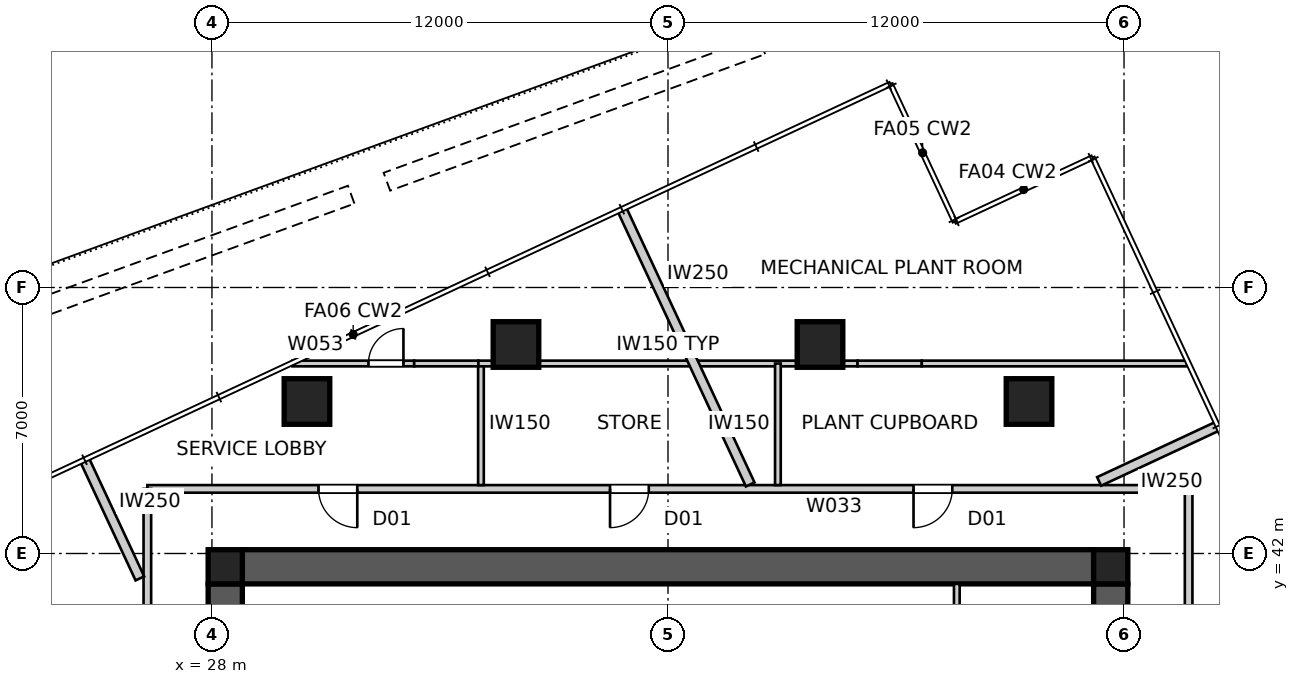
"""IFC4 building model, lengths in metres.
Left out: names, types, materials, properties, quantities, classifications, styles, units other than length and angle.
Written with IfcOpenShell. Run it as: python <this file> out.ifc"""

import sys

from ifc_helpers import new_model, si_unit, direction, frame, frame_2d, origin, origin_2d, place, context, subcontext, project, spatial, polyline, rectangle, outline, extrude, element, fill, save


model = new_model("IFC4")
c1 = context("Model", 3, precision=1e-05, world=origin(), true_north=direction((0.0, 1.0)))
c2 = subcontext(c1, "Body", "Model", "MODEL_VIEW")
j1 = project(units=[si_unit("LENGTHUNIT", "METRE"), si_unit("PLANEANGLEUNIT", "RADIAN")], contexts=[c1])
p1 = place(None, origin())
s1 = spatial("IfcSite", under=j1, at=p1, CompositionType="ELEMENT")
p2 = place(p1, origin())
s2 = spatial("IfcBuilding", under=s1, at=p2, CompositionType="ELEMENT")
p3 = place(p2, frame((0.0, 0.0, 171.0)))
s3 = spatial("IfcBuildingStorey", under=s2, at=p3, CompositionType="ELEMENT", Elevation=171.0)
p4 = place(p3, frame((28.8, 41.65, 0.0), z_axis=(0.0, 0.0, 1.0), x_axis=(1.0, 0.0, 0.0)))
e1 = element("IfcWall", 1, at=p4, inside=s3, PredefinedType="SHEAR", context=c2, shape_type="SweptSolid", body=[
    extrude(outline(polyline([(0.0, -0.45), (22.4, -0.45), (22.4, -0.025), (22.85, -0.025), (22.85, 0.025), (22.4, 0.025), (22.4, 0.45), (0.0, 0.45), (0.0, 0.025), (-0.45, 0.025), (-0.45, -0.025), (0.0, -0.025), (0.0, -0.45)])), origin(), (0.0, 0.0, 1.0), 5.0),
])
p5 = place(p3, frame((51.65, 18.8, 0.0), z_axis=(0.0, 0.0, 1.0), x_axis=(0.0, 1.0, 0.0)))
e2 = element("IfcWall", 2, at=p5, inside=s3, PredefinedType="SHEAR", context=c2, shape_type="SweptSolid", body=[
    extrude(outline(polyline([(0.0, -0.45), (22.4, -0.45), (22.4, -0.025), (22.85, -0.025), (22.85, 0.025), (22.4, 0.025), (22.4, 0.45), (0.0, 0.45), (0.0, 0.025), (-0.45, 0.025), (-0.45, -0.025), (0.0, -0.025), (0.0, -0.45)])), origin(), (0.0, 0.0, 1.0), 5.0),
])
p6 = place(p5, frame((11.14, 0.0, 0.0)))
e3 = element("IfcOpeningElement", 3, at=p6, cuts=e2, PredefinedType="OPENING", context=c2, shape_type="SweptSolid", body=[
    extrude(rectangle(XDim=1.02, YDim=2.4, at=frame_2d((0.51, 1.2))), frame((0.0, 0.46, 0.0), z_axis=(0.0, -1.0, 0.0), x_axis=(1.0, 0.0, 0.0)), (0.0, 0.0, 1.0), 0.92),
])
p7 = place(p3, frame((28.35, 41.2, 0.0), z_axis=(0.0, 0.0, 1.0), x_axis=(0.0, -1.0, 0.0)))
e4 = element("IfcWall", 4, at=p7, inside=s3, PredefinedType="SHEAR", context=c2, shape_type="SweptSolid", body=[
    extrude(outline(polyline([(0.0, -0.45), (22.4, -0.45), (22.4, -0.025), (22.85, -0.025), (22.85, 0.025), (22.4, 0.025), (22.4, 0.45), (0.0, 0.45), (0.0, 0.025), (-0.45, 0.025), (-0.45, -0.025), (0.0, -0.025), (0.0, -0.45)])), origin(), (0.0, 0.0, 1.0), 5.0),
])
p8 = place(p7, frame((11.14, 0.0, 0.0)))
e5 = element("IfcOpeningElement", 5, at=p8, cuts=e4, PredefinedType="OPENING", context=c2, shape_type="SweptSolid", body=[
    extrude(rectangle(XDim=1.02, YDim=2.4, at=frame_2d((0.51, 1.2))), frame((0.0, 0.46, 0.0), z_axis=(0.0, -1.0, 0.0), x_axis=(1.0, 0.0, 0.0)), (0.0, 0.0, 1.0), 0.92),
])
for number, where, z_axis, x_axis in (
    (6, (51.65, 41.65, 0.0), (0.0, 0.0, 1.0), (1.0, 0.0, 0.0)),
    (7, (28.35, 41.65, 0.0), (0.0, 0.0, 1.0), (1.0, 0.0, 0.0)),
):
    element("IfcColumn", number, at=place(p3, frame(where, z_axis=z_axis, x_axis=x_axis)), inside=s3, PredefinedType="COLUMN", context=c2, shape_type="SweptSolid", body=[
        extrude(rectangle(XDim=0.9, YDim=0.9, at=origin_2d()), origin(), (0.0, 0.0, 1.0), 5.0),
    ])
for number, where, z_axis, x_axis in (
    (8, (49.5, 46.0, 0.0), (0.0, 0.0, 1.0), (1.0, 0.0, 0.0)),
    (9, (44.0, 47.5, 0.0), (0.0, 0.0, 1.0), (1.0, 0.0, 0.0)),
    (10, (36.0, 47.5, 0.0), (0.0, 0.0, 1.0), (1.0, 0.0, 0.0)),
    (11, (30.5, 46.0, 0.0), (0.0, 0.0, 1.0), (1.0, 0.0, 0.0)),
):
    element("IfcColumn", number, at=place(p3, frame(where, z_axis=z_axis, x_axis=x_axis)), inside=s3, PredefinedType="COLUMN", context=c2, shape_type="SweptSolid", body=[
        extrude(rectangle(XDim=1.2, YDim=1.2, at=origin_2d()), origin(), (0.0, 0.0, 1.0), 5.0),
    ])
p9 = place(p3, frame((53.7, 16.0, 0.0), z_axis=(0.0, 0.0, 1.0), x_axis=(0.0, 1.0, 0.0)))
e12 = element("IfcWall", 12, at=p9, inside=s3, PredefinedType="PARTITIONING", context=c2, shape_type="SweptSolid", body=[
    extrude(rectangle(XDim=27.7, YDim=0.2, at=frame_2d((13.85, 0.0))), origin(), (0.0, 0.0, 1.0), 4.85),
])
p10 = place(p9, frame((22.176, 0.0, 0.0)))
e13 = element("IfcOpeningElement", 13, at=p10, cuts=e12, PredefinedType="OPENING", context=c2, shape_type="SweptSolid", body=[
    extrude(rectangle(XDim=1.02, YDim=2.34, at=frame_2d((0.51, 1.17))), frame((0.0, 0.11, 0.0), z_axis=(0.0, -1.0, 0.0), x_axis=(1.0, 0.0, 0.0)), (0.0, 0.0, 1.0), 0.22),
])
p11 = place(p9, frame((6.519, 0.0, 0.0)))
e14 = element("IfcOpeningElement", 14, at=p11, cuts=e12, PredefinedType="OPENING", context=c2, shape_type="SweptSolid", body=[
    extrude(rectangle(XDim=1.02, YDim=2.34, at=frame_2d((0.51, 1.17))), frame((0.0, 0.11, 0.0), z_axis=(0.0, -1.0, 0.0), x_axis=(1.0, 0.0, 0.0)), (0.0, 0.0, 1.0), 0.22),
])
p12 = place(p9, frame((14.505, 0.0, 0.0)))
e15 = element("IfcOpeningElement", 15, at=p12, cuts=e12, PredefinedType="OPENING", context=c2, shape_type="SweptSolid", body=[
    extrude(rectangle(XDim=1.02, YDim=2.34, at=frame_2d((0.51, 1.17))), frame((0.0, 0.11, 0.0), z_axis=(0.0, -1.0, 0.0), x_axis=(1.0, 0.0, 0.0)), (0.0, 0.0, 1.0), 0.22),
])
p13 = place(p3, frame((53.7, 43.7, 0.0), z_axis=(0.0, 0.0, 1.0), x_axis=(-1.0, 0.0, 0.0)))
e16 = element("IfcWall", 16, at=p13, inside=s3, PredefinedType="PARTITIONING", context=c2, shape_type="SweptSolid", body=[
    extrude(rectangle(XDim=27.4, YDim=0.2, at=frame_2d((13.7, 0.0))), origin(), (0.0, 0.0, 1.0), 4.85),
])
p14 = place(p13, frame((21.876, 0.0, 0.0)))
e17 = element("IfcOpeningElement", 17, at=p14, cuts=e16, PredefinedType="OPENING", context=c2, shape_type="SweptSolid", body=[
    extrude(rectangle(XDim=1.02, YDim=2.34, at=frame_2d((0.51, 1.17))), frame((0.0, 0.11, 0.0), z_axis=(0.0, -1.0, 0.0), x_axis=(1.0, 0.0, 0.0)), (0.0, 0.0, 1.0), 0.22),
])
p15 = place(p13, frame((6.219, 0.0, 0.0)))
e18 = element("IfcOpeningElement", 18, at=p15, cuts=e16, PredefinedType="OPENING", context=c2, shape_type="SweptSolid", body=[
    extrude(rectangle(XDim=1.02, YDim=2.34, at=frame_2d((0.51, 1.17))), frame((0.0, 0.11, 0.0), z_axis=(0.0, -1.0, 0.0), x_axis=(1.0, 0.0, 0.0)), (0.0, 0.0, 1.0), 0.22),
])
p16 = place(p13, frame((14.205, 0.0, 0.0)))
e19 = element("IfcOpeningElement", 19, at=p16, cuts=e16, PredefinedType="OPENING", context=c2, shape_type="SweptSolid", body=[
    extrude(rectangle(XDim=1.02, YDim=2.34, at=frame_2d((0.51, 1.17))), frame((0.0, 0.11, 0.0), z_axis=(0.0, -1.0, 0.0), x_axis=(1.0, 0.0, 0.0)), (0.0, 0.0, 1.0), 0.22),
])
p17 = place(p3, frame((26.3, 43.7, 0.0), z_axis=(0.0, 0.0, 1.0), x_axis=(0.0, -1.0, 0.0)))
e20 = element("IfcWall", 20, at=p17, inside=s3, PredefinedType="PARTITIONING", context=c2, shape_type="SweptSolid", body=[
    extrude(rectangle(XDim=27.7, YDim=0.2, at=frame_2d((13.85, 0.0))), origin(), (0.0, 0.0, 1.0), 4.85),
])
p18 = place(p17, frame((18.87, 0.0, 0.0)))
e21 = element("IfcOpeningElement", 21, at=p18, cuts=e20, PredefinedType="OPENING", context=c2, shape_type="SweptSolid", body=[
    extrude(rectangle(XDim=1.02, YDim=2.34, at=frame_2d((0.51, 1.17))), frame((0.0, 0.11, 0.0), z_axis=(0.0, -1.0, 0.0), x_axis=(1.0, 0.0, 0.0)), (0.0, 0.0, 1.0), 0.22),
])
p19 = place(p17, frame((6.545, 0.0, 0.0)))
e22 = element("IfcOpeningElement", 22, at=p19, cuts=e20, PredefinedType="OPENING", context=c2, shape_type="SweptSolid", body=[
    extrude(rectangle(XDim=1.02, YDim=2.34, at=frame_2d((0.51, 1.17))), frame((0.0, 0.11, 0.0), z_axis=(0.0, -1.0, 0.0), x_axis=(1.0, 0.0, 0.0)), (0.0, 0.0, 1.0), 0.22),
])
p20 = place(p3, frame((54.467, 45.353, 0.0), z_axis=(0.0, 0.0, 1.0), x_axis=(-0.906322475905, -0.422586759932, 0.0)))
e23 = element("IfcWall", 23, at=p20, inside=s3, PredefinedType="PARTITIONING", context=c2, shape_type="SweptSolid", body=[
    extrude(rectangle(XDim=3.446, YDim=0.25, at=frame_2d((1.723, 0.0))), origin(), (0.0, 0.0, 1.0), 4.85),
])
p21 = place(p3, frame((38.786, 51.06, 0.0), z_axis=(0.0, 0.0, 1.0), x_axis=(0.422621224778, -0.906306405344, 0.0)))
e24 = element("IfcWall", 24, at=p21, inside=s3, PredefinedType="PARTITIONING", context=c2, shape_type="SweptSolid", body=[
    extrude(rectangle(XDim=7.992, YDim=0.25, at=frame_2d((3.996, 0.0))), origin(), (0.0, 0.0, 1.0), 4.85),
])
p22 = place(p3, frame((24.647, 44.467, 0.0), z_axis=(0.0, 0.0, 1.0), x_axis=(0.422586759932, -0.906322475905, 0.0)))
e25 = element("IfcWall", 25, at=p22, inside=s3, PredefinedType="PARTITIONING", context=c2, shape_type="SweptSolid", body=[
    extrude(rectangle(XDim=3.446, YDim=0.25, at=frame_2d((1.723, 0.0))), origin(), (0.0, 0.0, 1.0), 4.85),
])
p23 = place(p3, frame((47.6, 41.2, 0.0), z_axis=(0.0, 0.0, 1.0), x_axis=(0.0, -1.0, 0.0)))
e26 = element("IfcWall", 26, at=p23, inside=s3, PredefinedType="SOLIDWALL", context=c2, shape_type="SweptSolid", body=[
    extrude(rectangle(XDim=5.9, YDim=0.15, at=frame_2d((2.95, 0.0))), origin(), (0.0, 0.0, 1.0), 4.85),
])
p24 = place(p3, frame((35.078, 47.0, 0.0), z_axis=(0.0, 0.0, 1.0), x_axis=(0.0, -1.0, 0.0)))
e27 = element("IfcWall", 27, at=p24, inside=s3, PredefinedType="SOLIDWALL", context=c2, shape_type="SweptSolid", body=[
    extrude(rectangle(XDim=3.2, YDim=0.15, at=frame_2d((1.6, 0.0))), origin(), (0.0, 0.0, 1.0), 4.85),
])
p25 = place(p3, frame((30.119, 47.0, 0.0), z_axis=(0.0, 0.0, 1.0), x_axis=(1.0, 0.0, 0.0)))
e28 = element("IfcWall", 28, at=p25, inside=s3, PredefinedType="SOLIDWALL", context=c2, shape_type="SweptSolid", body=[
    extrude(rectangle(XDim=3.202, YDim=0.15, at=frame_2d((1.601, 0.0))), origin(), (0.0, 0.0, 1.0), 4.85),
])
p26 = place(p25, frame((2.0, 0.0, 0.0)))
e29 = element("IfcOpeningElement", 29, at=p26, cuts=e28, PredefinedType="OPENING", context=c2, shape_type="SweptSolid", body=[
    extrude(rectangle(XDim=0.92, YDim=2.1, at=frame_2d((0.46, 1.05))), frame((0.0, 0.085, 0.0), z_axis=(0.0, -1.0, 0.0), x_axis=(1.0, 0.0, 0.0)), (0.0, 0.0, 1.0), 0.17),
])
p27 = place(p3, frame((33.322, 47.0, 0.0), z_axis=(0.0, 0.0, 1.0), x_axis=(1.0, 0.0, 0.0)))
e30 = element("IfcWall", 30, at=p27, inside=s3, PredefinedType="SOLIDWALL", context=c2, shape_type="SweptSolid", body=[
    extrude(rectangle(XDim=1.69, YDim=0.15, at=frame_2d((0.845, 0.0))), origin(), (0.0, 0.0, 1.0), 3.85),
])
p28 = place(p3, frame((35.012, 47.0, 0.0), z_axis=(0.0, 0.0, 1.0), x_axis=(1.0, 0.0, 0.0)))
e31 = element("IfcWall", 31, at=p28, inside=s3, PredefinedType="SOLIDWALL", context=c2, shape_type="SweptSolid", body=[
    extrude(rectangle(XDim=9.977, YDim=0.15, at=frame_2d((4.988, 0.0))), origin(), (0.0, 0.0, 1.0), 4.85),
])
p29 = place(p3, frame((44.988, 47.0, 0.0), z_axis=(0.0, 0.0, 1.0), x_axis=(1.0, 0.0, 0.0)))
e32 = element("IfcWall", 32, at=p29, inside=s3, PredefinedType="SOLIDWALL", context=c2, shape_type="SweptSolid", body=[
    extrude(rectangle(XDim=1.69, YDim=0.15, at=frame_2d((0.845, 0.0))), origin(), (0.0, 0.0, 1.0), 3.85),
])
p30 = place(p3, frame((46.678, 47.0, 0.0), z_axis=(0.0, 0.0, 1.0), x_axis=(1.0, 0.0, 0.0)))
e33 = element("IfcWall", 33, at=p30, inside=s3, PredefinedType="SOLIDWALL", context=c2, shape_type="SweptSolid", body=[
    extrude(rectangle(XDim=6.976, YDim=0.15, at=frame_2d((3.488, 0.0))), origin(), (0.0, 0.0, 1.0), 4.85),
])
p31 = place(p3, frame((42.892, 43.8, 0.0), z_axis=(0.0, 0.0, 1.0), x_axis=(0.0, 1.0, 0.0)))
e34 = element("IfcWall", 34, at=p31, inside=s3, PredefinedType="SOLIDWALL", context=c2, shape_type="SweptSolid", body=[
    extrude(rectangle(XDim=3.2, YDim=0.15, at=frame_2d((1.6, 0.0))), origin(), (0.0, 0.0, 1.0), 4.322),
])
p32 = place(p14, origin())
e35 = element("IfcDoor", 35, at=p32, inside=s3, OperationType="SINGLE_SWING_LEFT", PredefinedType="DOOR", context=c2, shape_type="SweptSolid", body=[
    extrude(rectangle(XDim=1.02, YDim=2.34, at=frame_2d((0.51, 1.17))), frame((0.0, 0.025, 0.0), z_axis=(0.0, -1.0, 0.0), x_axis=(1.0, 0.0, 0.0)), (0.0, 0.0, 1.0), 0.05),
])
fill(e17, e35)
p33 = place(p15, origin())
e36 = element("IfcDoor", 36, at=p33, inside=s3, OperationType="SINGLE_SWING_RIGHT", PredefinedType="DOOR", context=c2, shape_type="SweptSolid", body=[
    extrude(rectangle(XDim=1.02, YDim=2.34, at=frame_2d((0.51, 1.17))), frame((0.0, 0.025, 0.0), z_axis=(0.0, -1.0, 0.0), x_axis=(1.0, 0.0, 0.0)), (0.0, 0.0, 1.0), 0.05),
])
fill(e18, e36)
p34 = place(p16, origin())
e37 = element("IfcDoor", 37, at=p34, inside=s3, OperationType="SINGLE_SWING_RIGHT", PredefinedType="DOOR", context=c2, shape_type="SweptSolid", body=[
    extrude(rectangle(XDim=1.02, YDim=2.34, at=frame_2d((0.51, 1.17))), frame((0.0, 0.025, 0.0), z_axis=(0.0, -1.0, 0.0), x_axis=(1.0, 0.0, 0.0)), (0.0, 0.0, 1.0), 0.05),
])
fill(e19, e37)
p35 = place(p26, origin())
e38 = element("IfcDoor", 38, at=p35, inside=s3, OperationType="SINGLE_SWING_RIGHT", PredefinedType="DOOR", context=c2, shape_type="SweptSolid", body=[
    extrude(rectangle(XDim=0.92, YDim=2.1, at=frame_2d((0.46, 1.05))), frame((0.0, 0.025, 0.0), z_axis=(0.0, -1.0, 0.0), x_axis=(1.0, 0.0, 0.0)), (0.0, 0.0, 1.0), 0.05),
])
fill(e29, e38)
save(model, sys.argv[1])
